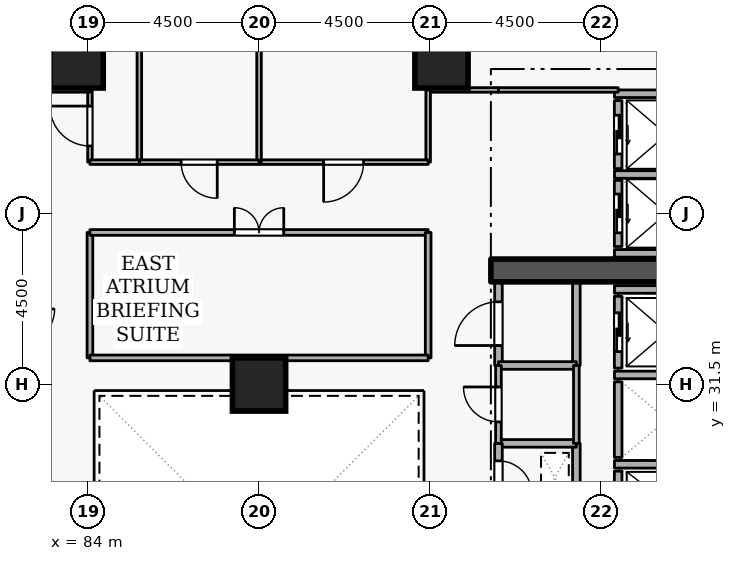
"""IFC4 building model, lengths in metres.
Left out: names, types, materials, properties, quantities, classifications, styles, units other than length and angle.
Written with IfcOpenShell. Run it as: python <this file> out.ifc"""

import sys

from ifc_helpers import new_model, si_unit, direction, frame, frame_2d, origin, origin_2d, place, context, subcontext, project, spatial, rectangle, extrude, element, fill, save


model = new_model("IFC4")
c1 = context("Model", 3, precision=1e-05, world=origin(), true_north=direction((0.0, 1.0)))
c2 = subcontext(c1, "Body", "Model", "MODEL_VIEW")
j1 = project(units=[si_unit("LENGTHUNIT", "METRE"), si_unit("PLANEANGLEUNIT", "RADIAN")], contexts=[c1])
p1 = place(None, origin())
s1 = spatial("IfcSite", under=j1, at=p1, CompositionType="ELEMENT")
p2 = place(p1, origin())
s2 = spatial("IfcBuilding", under=s1, at=p2, CompositionType="ELEMENT")
p3 = place(p2, frame((0.0, 0.0, 42.3)))
s3 = spatial("IfcBuildingStorey", under=s2, at=p3, CompositionType="ELEMENT", Elevation=42.3)
p4 = place(p3, frame((94.6, 34.5, 0.0), z_axis=(0.0, 0.0, 1.0), x_axis=(1.0, 0.0, 0.0)))
e1 = element("IfcWall", 1, at=p4, inside=s3, PredefinedType="SHEAR", context=c2, shape_type="SweptSolid", body=[
    extrude(rectangle(XDim=5.7, YDim=0.6, at=frame_2d((2.85, 0.0))), origin(), (0.0, 0.0, 1.0), 3.6),
])
for number, where, z_axis, x_axis in (
    (2, (93.3, 40.0, 0.0), (0.0, 0.0, 1.0), (1.0, 0.0, 0.0)),
    (3, (83.7, 40.0, 0.0), (0.0, 0.0, 1.0), (1.0, 0.0, 0.0)),
    (4, (88.5, 31.5, 0.0), (0.0, 0.0, 1.0), (1.0, 0.0, 0.0)),
):
    element("IfcColumn", number, at=place(p3, frame(where, z_axis=z_axis, x_axis=x_axis)), inside=s3, PredefinedType="COLUMN", context=c2, shape_type="SweptSolid", body=[
        extrude(rectangle(XDim=1.4, YDim=1.4, at=origin_2d()), origin(), (0.0, 0.0, 1.0), 3.6),
    ])
p5 = place(p3, frame((97.95, 29.22, 0.0), z_axis=(0.0, 0.0, 1.0), x_axis=(0.0, -1.0, 0.0)))
e5 = element("IfcWall", 5, at=p5, inside=s3, PredefinedType="STANDARD", context=c2, shape_type="SweptSolid", body=[
    extrude(rectangle(XDim=1.64, YDim=0.2, at=frame_2d((0.82, 0.0))), origin(), (0.0, 0.0, 1.0), 3.34),
])
p6 = place(p5, frame((0.31, 0.0, 0.0)))
e6 = element("IfcOpeningElement", 6, at=p6, cuts=e5, PredefinedType="OPENING", context=c2, shape_type="SweptSolid", body=[
    extrude(rectangle(XDim=1.02, YDim=2.06, at=frame_2d((0.51, 1.03))), frame((0.0, 0.11, 0.0), z_axis=(0.0, -1.0, 0.0), x_axis=(1.0, 0.0, 0.0)), (0.0, 0.0, 1.0), 0.22),
])
p7 = place(p3, frame((97.95, 31.57, 0.0), z_axis=(0.0, 0.0, 1.0), x_axis=(0.0, -1.0, 0.0)))
e7 = element("IfcWall", 7, at=p7, inside=s3, PredefinedType="STANDARD", context=c2, shape_type="SweptSolid", body=[
    extrude(rectangle(XDim=1.99, YDim=0.2, at=frame_2d((0.995, 0.0))), origin(), (0.0, 0.0, 1.0), 3.34),
])
p8 = place(p3, frame((97.95, 33.82, 0.0), z_axis=(0.0, 0.0, 1.0), x_axis=(0.0, -1.0, 0.0)))
e8 = element("IfcWall", 8, at=p8, inside=s3, PredefinedType="STANDARD", context=c2, shape_type="SweptSolid", body=[
    extrude(rectangle(XDim=1.89, YDim=0.2, at=frame_2d((0.945, 0.0))), origin(), (0.0, 0.0, 1.0), 3.34),
])
p9 = place(p8, frame((0.435, 0.0, 0.0)))
e9 = element("IfcOpeningElement", 9, at=p9, cuts=e8, PredefinedType="OPENING", context=c2, shape_type="SweptSolid", body=[
    extrude(rectangle(XDim=1.02, YDim=2.06, at=frame_2d((0.51, 1.03))), frame((0.0, 0.11, 0.0), z_axis=(0.0, -1.0, 0.0), x_axis=(1.0, 0.0, 0.0)), (0.0, 0.0, 1.0), 0.22),
])
p10 = place(p3, frame((97.95, 36.87, 0.0), z_axis=(0.0, 0.0, 1.0), x_axis=(0.0, -1.0, 0.0)))
e10 = element("IfcWall", 10, at=p10, inside=s3, PredefinedType="STANDARD", context=c2, shape_type="SweptSolid", body=[
    extrude(rectangle(XDim=1.74, YDim=0.2, at=frame_2d((0.87, 0.0))), origin(), (0.0, 0.0, 1.0), 3.34),
])
p11 = place(p10, frame((0.36, 0.0, 0.0)))
e11 = element("IfcOpeningElement", 11, at=p11, cuts=e10, PredefinedType="OPENING", context=c2, shape_type="SweptSolid", body=[
    extrude(rectangle(XDim=1.02, YDim=2.06, at=frame_2d((0.51, 1.03))), frame((0.0, 0.11, 0.0), z_axis=(0.0, -1.0, 0.0), x_axis=(1.0, 0.0, 0.0)), (0.0, 0.0, 1.0), 0.22),
])
p12 = place(p3, frame((97.95, 38.97, 0.0), z_axis=(0.0, 0.0, 1.0), x_axis=(0.0, -1.0, 0.0)))
e12 = element("IfcWall", 12, at=p12, inside=s3, PredefinedType="STANDARD", context=c2, shape_type="SweptSolid", body=[
    extrude(rectangle(XDim=1.79, YDim=0.2, at=frame_2d((0.895, 0.0))), origin(), (0.0, 0.0, 1.0), 3.34),
])
p13 = place(p12, frame((0.385, 0.0, 0.0)))
e13 = element("IfcOpeningElement", 13, at=p13, cuts=e12, PredefinedType="OPENING", context=c2, shape_type="SweptSolid", body=[
    extrude(rectangle(XDim=1.02, YDim=2.06, at=frame_2d((0.51, 1.03))), frame((0.0, 0.11, 0.0), z_axis=(0.0, -1.0, 0.0), x_axis=(1.0, 0.0, 0.0)), (0.0, 0.0, 1.0), 0.22),
])
for number, where, z_axis, x_axis in (
    (14, (97.852, 29.4, 0.0), (0.0, 0.0, 1.0), (1.0, 0.0, 0.0)),
    (15, (97.852, 31.75, 0.0), (0.0, 0.0, 1.0), (1.0, 0.0, 0.0)),
    (16, (97.852, 34.0, 0.0), (0.0, 0.0, 1.0), (1.0, 0.0, 0.0)),
):
    element("IfcWall", number, at=place(p3, frame(where, z_axis=z_axis, x_axis=x_axis)), inside=s3, PredefinedType="STANDARD", context=c2, shape_type="SweptSolid", body=[
        extrude(rectangle(XDim=2.436, YDim=0.2, at=frame_2d((1.218, 0.0))), origin(), (0.0, 0.0, 1.0), 3.34),
    ])
for number, where, z_axis, x_axis in (
    (17, (97.852, 37.025, 0.0), (0.0, 0.0, 1.0), (1.0, 0.0, 0.0)),
    (18, (97.852, 34.95, 0.0), (0.0, 0.0, 1.0), (1.0, 0.0, 0.0)),
):
    element("IfcWall", number, at=place(p3, frame(where, z_axis=z_axis, x_axis=x_axis)), inside=s3, PredefinedType="STANDARD", context=c2, shape_type="SweptSolid", body=[
        extrude(rectangle(XDim=2.746, YDim=0.2, at=frame_2d((1.373, 0.0))), origin(), (0.0, 0.0, 1.0), 3.34),
    ])
p14 = place(p3, frame((97.852, 39.15, 0.0), z_axis=(0.0, 0.0, 1.0), x_axis=(1.0, 0.0, 0.0)))
e19 = element("IfcWall", 19, at=p14, inside=s3, PredefinedType="STANDARD", context=c2, shape_type="SweptSolid", body=[
    extrude(rectangle(XDim=2.636, YDim=0.2, at=frame_2d((1.318, 0.0))), origin(), (0.0, 0.0, 1.0), 3.34),
])
p15 = place(p3, frame((96.85, 28.15, 0.0), z_axis=(0.0, 0.0, 1.0), x_axis=(0.0, 1.0, 0.0)))
e20 = element("IfcWall", 20, at=p15, inside=s3, PredefinedType="STANDARD", context=c2, shape_type="SweptSolid", body=[
    extrude(rectangle(XDim=1.8, YDim=0.2, at=frame_2d((0.9, 0.0))), origin(), (0.0, 0.0, 1.0), 3.34),
])
p16 = place(p3, frame((96.85, 29.95, 0.0), z_axis=(0.0, 0.0, 1.0), x_axis=(-1.0, 0.0, 0.0)))
e21 = element("IfcWall", 21, at=p16, inside=s3, PredefinedType="STANDARD", context=c2, shape_type="SweptSolid", body=[
    extrude(rectangle(XDim=2.05, YDim=0.2, at=frame_2d((1.025, 0.0))), origin(), (0.0, 0.0, 1.0), 3.34),
])
p17 = place(p3, frame((94.8, 29.95, 0.0), z_axis=(0.0, 0.0, 1.0), x_axis=(0.0, -1.0, 0.0)))
e22 = element("IfcWall", 22, at=p17, inside=s3, PredefinedType="STANDARD", context=c2, shape_type="SweptSolid", body=[
    extrude(rectangle(XDim=1.8, YDim=0.2, at=frame_2d((0.9, 0.0))), origin(), (0.0, 0.0, 1.0), 3.34),
])
p18 = place(p17, frame((0.46, 0.0, 0.0)))
e23 = element("IfcOpeningElement", 23, at=p18, cuts=e22, PredefinedType="OPENING", context=c2, shape_type="SweptSolid", body=[
    extrude(rectangle(XDim=0.88, YDim=2.04, at=frame_2d((0.44, 1.02))), frame((0.0, 0.11, 0.0), z_axis=(0.0, -1.0, 0.0), x_axis=(1.0, 0.0, 0.0)), (0.0, 0.0, 1.0), 0.22),
])
p19 = place(p3, frame((94.8, 32.0, 0.0), z_axis=(0.0, 0.0, 1.0), x_axis=(0.0, 1.0, 0.0)))
e24 = element("IfcWall", 24, at=p19, inside=s3, PredefinedType="STANDARD", context=c2, shape_type="SweptSolid", body=[
    extrude(rectangle(XDim=2.2, YDim=0.2, at=frame_2d((1.1, 0.0))), origin(), (0.0, 0.0, 1.0), 3.34),
])
p20 = place(p19, frame((0.525, 0.0, 0.0)))
e25 = element("IfcOpeningElement", 25, at=p20, cuts=e24, PredefinedType="OPENING", context=c2, shape_type="SweptSolid", body=[
    extrude(rectangle(XDim=1.15, YDim=2.1, at=frame_2d((0.575, 1.05))), frame((0.0, 0.11, 0.0), z_axis=(0.0, -1.0, 0.0), x_axis=(1.0, 0.0, 0.0)), (0.0, 0.0, 1.0), 0.22),
])
p21 = place(p3, frame((96.85, 34.2, 0.0), z_axis=(0.0, 0.0, 1.0), x_axis=(0.0, -1.0, 0.0)))
e26 = element("IfcWall", 26, at=p21, inside=s3, PredefinedType="STANDARD", context=c2, shape_type="SweptSolid", body=[
    extrude(rectangle(XDim=2.2, YDim=0.2, at=frame_2d((1.1, 0.0))), origin(), (0.0, 0.0, 1.0), 3.34),
])
p22 = place(p3, frame((96.85, 32.0, 0.0), z_axis=(0.0, 0.0, 1.0), x_axis=(-1.0, 0.0, 0.0)))
e27 = element("IfcWall", 27, at=p22, inside=s3, PredefinedType="STANDARD", context=c2, shape_type="SweptSolid", body=[
    extrude(rectangle(XDim=2.05, YDim=0.2, at=frame_2d((1.025, 0.0))), origin(), (0.0, 0.0, 1.0), 3.34),
])
p23 = place(p3, frame((94.8, 29.95, 0.0), z_axis=(0.0, 0.0, 1.0), x_axis=(0.0, 1.0, 0.0)))
e28 = element("IfcWall", 28, at=p23, inside=s3, PredefinedType="PARTITIONING", context=c2, shape_type="SweptSolid", body=[
    extrude(rectangle(XDim=2.05, YDim=0.15, at=frame_2d((1.025, 0.0))), origin(), (0.0, 0.0, 1.0), 3.34),
])
p24 = place(p23, frame((0.565, 0.0, 0.0)))
e29 = element("IfcOpeningElement", 29, at=p24, cuts=e28, PredefinedType="OPENING", context=c2, shape_type="SweptSolid", body=[
    extrude(rectangle(XDim=0.92, YDim=2.08, at=frame_2d((0.46, 1.04))), frame((0.0, 0.085, 0.0), z_axis=(0.0, -1.0, 0.0), x_axis=(1.0, 0.0, 0.0)), (0.0, 0.0, 1.0), 0.17),
])
p25 = place(p3, frame((96.85, 32.0, 0.0), z_axis=(0.0, 0.0, 1.0), x_axis=(0.0, -1.0, 0.0)))
e30 = element("IfcWall", 30, at=p25, inside=s3, PredefinedType="PARTITIONING", context=c2, shape_type="SweptSolid", body=[
    extrude(rectangle(XDim=2.05, YDim=0.15, at=frame_2d((1.025, 0.0))), origin(), (0.0, 0.0, 1.0), 3.34),
])
p26 = place(p3, frame((97.95, 39.25, 0.0), z_axis=(0.0, 0.0, 1.0), x_axis=(-1.0, 0.0, 0.0)))
e31 = element("IfcWall", 31, at=p26, inside=s3, PredefinedType="PARTITIONING", context=c2, shape_type="SweptSolid", body=[
    extrude(rectangle(XDim=3.15, YDim=0.12, at=frame_2d((1.575, 0.0))), origin(), (0.0, 0.0, 1.0), 3.34),
])
p27 = place(p3, frame((94.8, 39.25, 0.0), z_axis=(0.0, 0.0, 1.0), x_axis=(-1.0, 0.0, 0.0)))
e32 = element("IfcWall", 32, at=p27, inside=s3, PredefinedType="PARTITIONING", context=c2, shape_type="SweptSolid", body=[
    extrude(rectangle(XDim=1.85, YDim=0.12, at=frame_2d((0.925, 0.0))), origin(), (0.0, 0.0, 1.0), 3.34),
])
p28 = place(p3, frame((92.95, 39.25, 0.0), z_axis=(0.0, 0.0, 1.0), x_axis=(0.0, -1.0, 0.0)))
e33 = element("IfcWall", 33, at=p28, inside=s3, PredefinedType="PARTITIONING", context=c2, shape_type="SweptSolid", body=[
    extrude(rectangle(XDim=1.9, YDim=0.12, at=frame_2d((0.95, 0.0))), origin(), (0.0, 0.0, 1.0), 3.34),
])
p29 = place(p3, frame((92.95, 37.35, 0.0), z_axis=(0.0, 0.0, 1.0), x_axis=(-1.0, 0.0, 0.0)))
e34 = element("IfcWall", 34, at=p29, inside=s3, PredefinedType="PARTITIONING", context=c2, shape_type="SweptSolid", body=[
    extrude(rectangle(XDim=4.45, YDim=0.12, at=frame_2d((2.225, 0.0))), origin(), (0.0, 0.0, 1.0), 3.34),
])
p30 = place(p29, frame((1.7, 0.0, 0.0)))
e35 = element("IfcOpeningElement", 35, at=p30, cuts=e34, PredefinedType="OPENING", context=c2, shape_type="SweptSolid", body=[
    extrude(rectangle(XDim=1.05, YDim=2.1, at=frame_2d((0.525, 1.05))), frame((0.0, 0.07, 0.0), z_axis=(0.0, -1.0, 0.0), x_axis=(1.0, 0.0, 0.0)), (0.0, 0.0, 1.0), 0.14),
])
p31 = place(p3, frame((88.5, 37.35, 0.0), z_axis=(0.0, 0.0, 1.0), x_axis=(0.0, 1.0, 0.0)))
e36 = element("IfcWall", 36, at=p31, inside=s3, PredefinedType="PARTITIONING", context=c2, shape_type="SweptSolid", body=[
    extrude(rectangle(XDim=6.95, YDim=0.12, at=frame_2d((3.475, 0.0))), origin(), (0.0, 0.0, 1.0), 2.882),
])
p32 = place(p3, frame((85.35, 37.35, 0.0), z_axis=(0.0, 0.0, 1.0), x_axis=(0.0, 1.0, 0.0)))
e37 = element("IfcWall", 37, at=p32, inside=s3, PredefinedType="PARTITIONING", context=c2, shape_type="SweptSolid", body=[
    extrude(rectangle(XDim=7.87, YDim=0.12, at=frame_2d((3.935, 0.0))), origin(), (0.0, 0.0, 1.0), 3.34),
])
p33 = place(p3, frame((88.5, 37.35, 0.0), z_axis=(0.0, 0.0, 1.0), x_axis=(-1.0, 0.0, 0.0)))
e38 = element("IfcWall", 38, at=p33, inside=s3, PredefinedType="PARTITIONING", context=c2, shape_type="SweptSolid", body=[
    extrude(rectangle(XDim=3.15, YDim=0.12, at=frame_2d((1.575, 0.0))), origin(), (0.0, 0.0, 1.0), 3.34),
])
p34 = place(p33, frame((1.1, 0.0, 0.0)))
e39 = element("IfcOpeningElement", 39, at=p34, cuts=e38, PredefinedType="OPENING", context=c2, shape_type="SweptSolid", body=[
    extrude(rectangle(XDim=0.95, YDim=2.1, at=frame_2d((0.475, 1.05))), frame((0.0, 0.07, 0.0), z_axis=(0.0, -1.0, 0.0), x_axis=(1.0, 0.0, 0.0)), (0.0, 0.0, 1.0), 0.14),
])
p35 = place(p3, frame((84.05, 37.35, 0.0), z_axis=(0.0, 0.0, 1.0), x_axis=(0.0, 1.0, 0.0)))
e40 = element("IfcWall", 40, at=p35, inside=s3, PredefinedType="PARTITIONING", context=c2, shape_type="SweptSolid", body=[
    extrude(rectangle(XDim=1.9, YDim=0.12, at=frame_2d((0.95, 0.0))), origin(), (0.0, 0.0, 1.0), 3.34),
])
p36 = place(p35, frame((0.425, 0.0, 0.0)))
e41 = element("IfcOpeningElement", 41, at=p36, cuts=e40, PredefinedType="OPENING", context=c2, shape_type="SweptSolid", body=[
    extrude(rectangle(XDim=1.05, YDim=2.1, at=frame_2d((0.525, 1.05))), frame((0.0, 0.07, 0.0), z_axis=(0.0, -1.0, 0.0), x_axis=(1.0, 0.0, 0.0)), (0.0, 0.0, 1.0), 0.14),
])
p37 = place(p3, frame((84.05, 39.25, 0.0), z_axis=(0.0, 0.0, 1.0), x_axis=(-1.0, 0.0, 0.0)))
e42 = element("IfcWall", 42, at=p37, inside=s3, PredefinedType="PARTITIONING", context=c2, shape_type="SweptSolid", body=[
    extrude(rectangle(XDim=1.85, YDim=0.12, at=frame_2d((0.925, 0.0))), origin(), (0.0, 0.0, 1.0), 3.34),
])
p38 = place(p3, frame((85.35, 37.35, 0.0), z_axis=(0.0, 0.0, 1.0), x_axis=(-1.0, 0.0, 0.0)))
e43 = element("IfcWall", 43, at=p38, inside=s3, PredefinedType="PARTITIONING", context=c2, shape_type="SweptSolid", body=[
    extrude(rectangle(XDim=1.3, YDim=0.12, at=frame_2d((0.65, 0.0))), origin(), (0.0, 0.0, 1.0), 3.34),
])
p39 = place(p3, frame((84.05, 32.2, 0.0), z_axis=(0.0, 0.0, 1.0), x_axis=(0.0, 1.0, 0.0)))
e44 = element("IfcWall", 44, at=p39, inside=s3, PredefinedType="PARTITIONING", context=c2, shape_type="SweptSolid", body=[
    extrude(rectangle(XDim=3.3, YDim=0.15, at=frame_2d((1.65, 0.0))), origin(), (0.0, 0.0, 1.0), 3.34),
])
p40 = place(p3, frame((84.05, 35.5, 0.0), z_axis=(0.0, 0.0, 1.0), x_axis=(1.0, 0.0, 0.0)))
e45 = element("IfcWall", 45, at=p40, inside=s3, PredefinedType="PARTITIONING", context=c2, shape_type="SweptSolid", body=[
    extrude(rectangle(XDim=8.9, YDim=0.15, at=frame_2d((4.45, 0.0))), origin(), (0.0, 0.0, 1.0), 3.34),
])
p41 = place(p40, frame((3.8, 0.0, 0.0)))
e46 = element("IfcOpeningElement", 46, at=p41, cuts=e45, PredefinedType="OPENING", context=c2, shape_type="SweptSolid", body=[
    extrude(rectangle(XDim=1.3, YDim=2.12, at=frame_2d((0.65, 1.06))), frame((0.0, 0.085, 0.0), z_axis=(0.0, -1.0, 0.0), x_axis=(1.0, 0.0, 0.0)), (0.0, 0.0, 1.0), 0.17),
])
p42 = place(p3, frame((92.95, 35.5, 0.0), z_axis=(0.0, 0.0, 1.0), x_axis=(0.0, -1.0, 0.0)))
e47 = element("IfcWall", 47, at=p42, inside=s3, PredefinedType="PARTITIONING", context=c2, shape_type="SweptSolid", body=[
    extrude(rectangle(XDim=3.3, YDim=0.15, at=frame_2d((1.65, 0.0))), origin(), (0.0, 0.0, 1.0), 3.34),
])
p43 = place(p3, frame((92.95, 32.2, 0.0), z_axis=(0.0, 0.0, 1.0), x_axis=(-1.0, 0.0, 0.0)))
e48 = element("IfcWall", 48, at=p43, inside=s3, PredefinedType="PARTITIONING", context=c2, shape_type="SweptSolid", body=[
    extrude(rectangle(XDim=8.9, YDim=0.15, at=frame_2d((4.45, 0.0))), origin(), (0.0, 0.0, 1.0), 3.34),
])
p44 = place(p9, origin())
e49 = element("IfcDoor", 49, at=p44, inside=s3, OperationType="SLIDING_TO_LEFT", PredefinedType="DOOR", context=c2, shape_type="SweptSolid", body=[
    extrude(rectangle(XDim=1.02, YDim=2.06, at=frame_2d((0.51, 1.03))), frame((0.0, 0.025, 0.0), z_axis=(0.0, -1.0, 0.0), x_axis=(1.0, 0.0, 0.0)), (0.0, 0.0, 1.0), 0.05),
])
fill(e9, e49)
p45 = place(p11, origin())
e50 = element("IfcDoor", 50, at=p45, inside=s3, OperationType="SLIDING_TO_LEFT", PredefinedType="DOOR", context=c2, shape_type="SweptSolid", body=[
    extrude(rectangle(XDim=1.02, YDim=2.06, at=frame_2d((0.51, 1.03))), frame((0.0, 0.025, 0.0), z_axis=(0.0, -1.0, 0.0), x_axis=(1.0, 0.0, 0.0)), (0.0, 0.0, 1.0), 0.05),
])
fill(e11, e50)
p46 = place(p13, origin())
e51 = element("IfcDoor", 51, at=p46, inside=s3, OperationType="SLIDING_TO_LEFT", PredefinedType="DOOR", context=c2, shape_type="SweptSolid", body=[
    extrude(rectangle(XDim=1.02, YDim=2.06, at=frame_2d((0.51, 1.03))), frame((0.0, 0.025, 0.0), z_axis=(0.0, -1.0, 0.0), x_axis=(1.0, 0.0, 0.0)), (0.0, 0.0, 1.0), 0.05),
])
fill(e13, e51)
p47 = place(p18, origin())
e52 = element("IfcDoor", 52, at=p47, inside=s3, OperationType="SINGLE_SWING_RIGHT", PredefinedType="DOOR", context=c2, shape_type="SweptSolid", body=[
    extrude(rectangle(XDim=0.88, YDim=2.04, at=frame_2d((0.44, 1.02))), frame((0.0, 0.025, 0.0), z_axis=(0.0, -1.0, 0.0), x_axis=(1.0, 0.0, 0.0)), (0.0, 0.0, 1.0), 0.05),
])
fill(e23, e52)
p48 = place(p24, origin())
e53 = element("IfcDoor", 53, at=p48, inside=s3, OperationType="SINGLE_SWING_RIGHT", PredefinedType="DOOR", context=c2, shape_type="SweptSolid", body=[
    extrude(rectangle(XDim=0.92, YDim=2.08, at=frame_2d((0.46, 1.04))), frame((0.0, 0.025, 0.0), z_axis=(0.0, -1.0, 0.0), x_axis=(1.0, 0.0, 0.0)), (0.0, 0.0, 1.0), 0.05),
])
fill(e29, e53)
p49 = place(p20, origin())
e54 = element("IfcDoor", 54, at=p49, inside=s3, OperationType="SINGLE_SWING_LEFT", PredefinedType="DOOR", context=c2, shape_type="SweptSolid", body=[
    extrude(rectangle(XDim=1.15, YDim=2.1, at=frame_2d((0.575, 1.05))), frame((0.0, 0.025, 0.0), z_axis=(0.0, -1.0, 0.0), x_axis=(1.0, 0.0, 0.0)), (0.0, 0.0, 1.0), 0.05),
])
fill(e25, e54)
p50 = place(p30, origin())
e55 = element("IfcDoor", 55, at=p50, inside=s3, OperationType="SINGLE_SWING_RIGHT", PredefinedType="DOOR", context=c2, shape_type="SweptSolid", body=[
    extrude(rectangle(XDim=1.05, YDim=2.1, at=frame_2d((0.525, 1.05))), frame((0.0, 0.025, 0.0), z_axis=(0.0, -1.0, 0.0), x_axis=(1.0, 0.0, 0.0)), (0.0, 0.0, 1.0), 0.05),
])
fill(e35, e55)
p51 = place(p34, origin())
e56 = element("IfcDoor", 56, at=p51, inside=s3, OperationType="SINGLE_SWING_LEFT", PredefinedType="DOOR", context=c2, shape_type="SweptSolid", body=[
    extrude(rectangle(XDim=0.95, YDim=2.1, at=frame_2d((0.475, 1.05))), frame((0.0, 0.025, 0.0), z_axis=(0.0, -1.0, 0.0), x_axis=(1.0, 0.0, 0.0)), (0.0, 0.0, 1.0), 0.05),
])
fill(e39, e56)
p52 = place(p36, origin())
e57 = element("IfcDoor", 57, at=p52, inside=s3, OperationType="SINGLE_SWING_RIGHT", PredefinedType="DOOR", context=c2, shape_type="SweptSolid", body=[
    extrude(rectangle(XDim=1.05, YDim=2.1, at=frame_2d((0.525, 1.05))), frame((0.0, 0.025, 0.0), z_axis=(0.0, -1.0, 0.0), x_axis=(1.0, 0.0, 0.0)), (0.0, 0.0, 1.0), 0.05),
])
fill(e41, e57)
p53 = place(p41, origin())
e58 = element("IfcDoor", 58, at=p53, inside=s3, OperationType="DOUBLE_DOOR_SINGLE_SWING", PredefinedType="DOOR", context=c2, shape_type="SweptSolid", body=[
    extrude(rectangle(XDim=1.3, YDim=2.12, at=frame_2d((0.65, 1.06))), frame((0.0, 0.025, 0.0), z_axis=(0.0, -1.0, 0.0), x_axis=(1.0, 0.0, 0.0)), (0.0, 0.0, 1.0), 0.05),
])
fill(e46, e58)
save(model, sys.argv[1])
